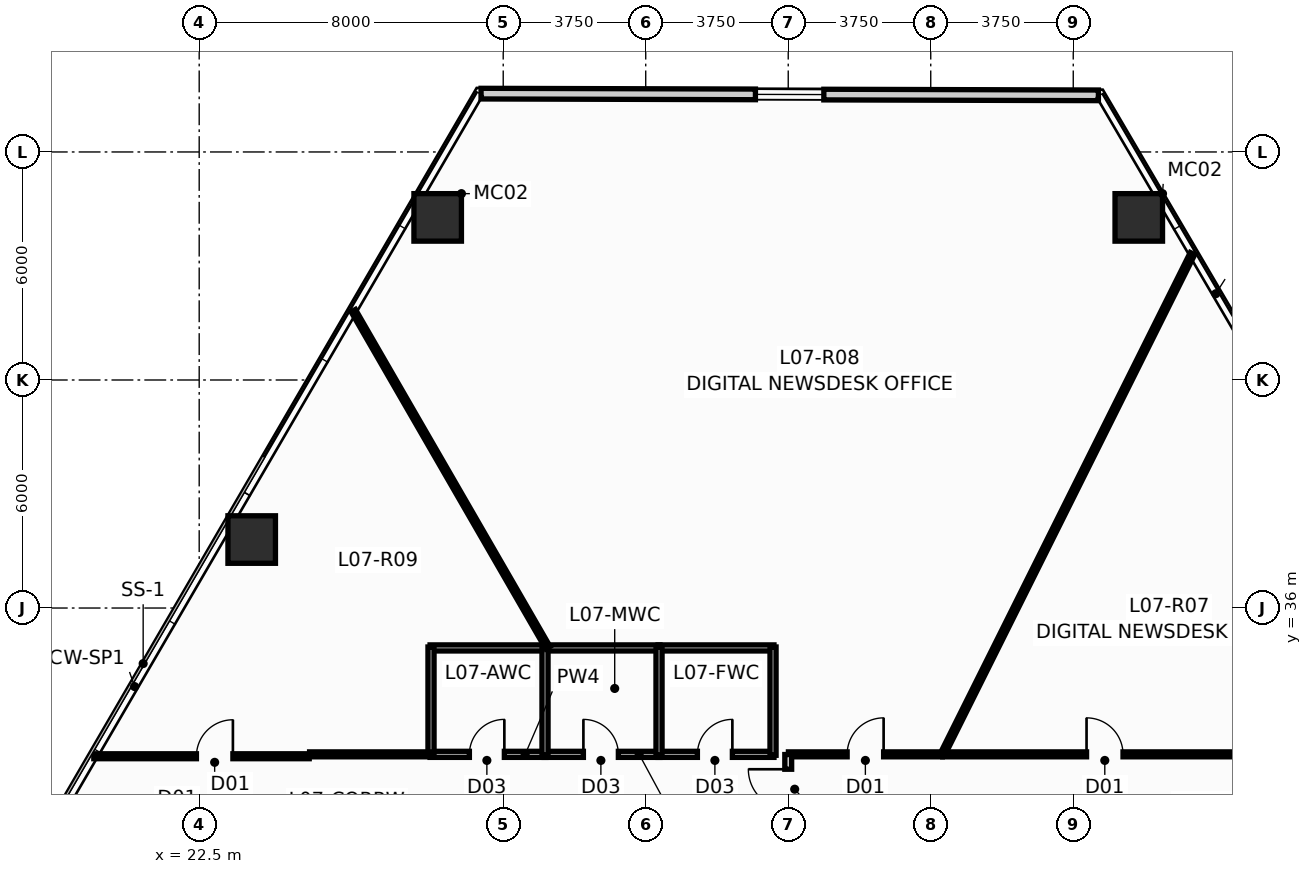
"""IFC4 building model, lengths in metres.
Left out: names, types, materials, properties, quantities, classifications, styles, units other than length and angle.
Written with IfcOpenShell. Run it as: python <this file> out.ifc"""

import sys

from ifc_helpers import new_model, si_unit, direction, frame, frame_2d, origin, origin_2d, place, context, subcontext, project, spatial, rectangle, hollow_rectangle, extrude, source, transform, mapped, element, fill, save


model = new_model("IFC4")
c1 = context("Model", 3, precision=1e-05, world=origin(), true_north=direction((0.0, 1.0)))
c2 = subcontext(c1, "Body", "Model", "MODEL_VIEW")
j1 = project(units=[si_unit("LENGTHUNIT", "METRE"), si_unit("PLANEANGLEUNIT", "RADIAN")], contexts=[c1])
p1 = place(None, origin())
s1 = spatial("IfcSite", under=j1, at=p1, CompositionType="ELEMENT")
p2 = place(p1, origin())
s2 = spatial("IfcBuilding", under=s1, at=p2, CompositionType="ELEMENT")
p3 = place(p2, frame((0.0, 0.0, 31.25)))
s3 = spatial("IfcBuildingStorey", under=s2, at=p3, CompositionType="ELEMENT", Elevation=31.25)
m1 = source(origin(), c2, "Body", "SweptSolid", [
    extrude(hollow_rectangle(XDim=1.25, YDim=1.25, WallThickness=0.07, at=origin_2d()), origin(), (0.0, 0.0, 1.0), 3.651),
])
for number, where, z_axis, x_axis in (
    (1, (47.224, 46.278, 0.0), (-0.024, 0.002, 1.0), (-0.075, -0.997, 0.0)),
    (2, (28.776, 46.278, 0.0), (0.024, 0.002, 1.0), (-0.075, 0.997, 0.0)),
):
    element("IfcColumn", number, at=place(p3, frame(where, z_axis=z_axis, x_axis=x_axis)), inside=s3, PredefinedType="COLUMN", context=c2, shape_type="MappedRepresentation", body=[
        mapped(m1, transform((0.0, 0.0, 0.0), scale=1.0)),
    ])
m2 = source(origin(), c2, "Body", "SweptSolid", [
    extrude(hollow_rectangle(XDim=1.25, YDim=1.25, WallThickness=0.07, at=origin_2d()), origin(), (0.0, 0.0, 1.0), 3.651),
])
p4 = place(p3, frame((23.882, 37.802, 0.0), z_axis=(0.019393993486, -0.006018825565, 0.999793802119), x_axis=(0.296399214872, 0.955064136811, 0.0)))
e3 = element("IfcColumn", 3, at=p4, inside=s3, PredefinedType="COLUMN", context=c2, shape_type="MappedRepresentation", body=[
    mapped(m2, transform((0.0, 0.0, 0.0), scale=1.0)),
])
p5 = place(p3, frame((29.917, 49.535, 0.0), z_axis=(0.0, 0.0, 1.0), x_axis=(0.999996176707, -0.00276524341, 0.0)))
e4 = element("IfcWall", 4, at=p5, inside=s3, PredefinedType="STANDARD", context=c2, shape_type="SweptSolid", body=[
    extrude(rectangle(XDim=16.245, YDim=0.28, at=frame_2d((8.123, 0.0))), origin(), (0.0, 0.0, 1.0), 3.4),
])
p6 = place(p5, frame((7.22, 0.0, 0.9)))
e5 = element("IfcOpeningElement", 5, at=p6, cuts=e4, PredefinedType="OPENING", context=c2, shape_type="SweptSolid", body=[
    extrude(rectangle(XDim=1.8, YDim=1.8, at=frame_2d((0.9, 0.9))), frame((0.0, 0.152, 0.0), z_axis=(0.0, -1.0, 0.0), x_axis=(1.0, 0.0, 0.0)), (0.0, 0.0, 1.0), 0.304),
])
p7 = place(p3, frame((28.575, 32.15, 0.0), z_axis=(0.0, 0.0, 1.0), x_axis=(1.0, 0.0, 0.0)))
e6 = element("IfcWall", 6, at=p7, inside=s3, PredefinedType="PLUMBINGWALL", context=c2, shape_type="SweptSolid", body=[
    extrude(rectangle(XDim=3.05, YDim=0.16, at=frame_2d((1.525, 0.0))), origin(), (0.0, 0.0, 1.0), 3.4),
])
p8 = place(p7, frame((1.035, 0.0, 0.0)))
e7 = element("IfcOpeningElement", 7, at=p8, cuts=e6, PredefinedType="OPENING", context=c2, shape_type="SweptSolid", body=[
    extrude(rectangle(XDim=0.92, YDim=2.1, at=frame_2d((0.46, 1.05))), frame((0.0, 0.092, 0.0), z_axis=(0.0, -1.0, 0.0), x_axis=(1.0, 0.0, 0.0)), (0.0, 0.0, 1.0), 0.184),
])
p9 = place(p3, frame((31.575, 32.15, 0.0), z_axis=(0.0, 0.0, 1.0), x_axis=(1.0, 0.0, 0.0)))
e8 = element("IfcWall", 8, at=p9, inside=s3, PredefinedType="PLUMBINGWALL", context=c2, shape_type="SweptSolid", body=[
    extrude(rectangle(XDim=3.05, YDim=0.16, at=frame_2d((1.525, 0.0))), origin(), (0.0, 0.0, 1.0), 3.4),
])
p10 = place(p9, frame((1.035, 0.0, 0.0)))
e9 = element("IfcOpeningElement", 9, at=p10, cuts=e8, PredefinedType="OPENING", context=c2, shape_type="SweptSolid", body=[
    extrude(rectangle(XDim=0.92, YDim=2.1, at=frame_2d((0.46, 1.05))), frame((0.0, 0.092, 0.0), z_axis=(0.0, -1.0, 0.0), x_axis=(1.0, 0.0, 0.0)), (0.0, 0.0, 1.0), 0.184),
])
p11 = place(p3, frame((34.575, 32.15, 0.0), z_axis=(0.0, 0.0, 1.0), x_axis=(1.0, 0.0, 0.0)))
e10 = element("IfcWall", 10, at=p11, inside=s3, PredefinedType="PLUMBINGWALL", context=c2, shape_type="SweptSolid", body=[
    extrude(rectangle(XDim=3.05, YDim=0.16, at=frame_2d((1.525, 0.0))), origin(), (0.0, 0.0, 1.0), 3.4),
])
p12 = place(p11, frame((1.035, 0.0, 0.0)))
e11 = element("IfcOpeningElement", 11, at=p12, cuts=e10, PredefinedType="OPENING", context=c2, shape_type="SweptSolid", body=[
    extrude(rectangle(XDim=0.92, YDim=2.1, at=frame_2d((0.46, 1.05))), frame((0.0, 0.092, 0.0), z_axis=(0.0, -1.0, 0.0), x_axis=(1.0, 0.0, 0.0)), (0.0, 0.0, 1.0), 0.184),
])
for number, where, z_axis, x_axis in (
    (12, (28.575, 34.95, 0.0), (0.0, 0.0, 1.0), (1.0, 0.0, 0.0)),
    (13, (37.625, 34.95, 0.0), (0.0, 0.0, 1.0), (-1.0, 0.0, 0.0)),
):
    element("IfcWall", number, at=place(p3, frame(where, z_axis=z_axis, x_axis=x_axis)), inside=s3, PredefinedType="PLUMBINGWALL", context=c2, shape_type="SweptSolid", body=[
        extrude(rectangle(XDim=3.05, YDim=0.16, at=frame_2d((1.525, 0.0))), origin(), (0.0, 0.0, 1.0), 3.026),
    ])
p13 = place(p3, frame((31.655, 34.95, 0.0), z_axis=(0.0, 0.0, 1.0), x_axis=(1.0, 0.0, 0.0)))
e14 = element("IfcWall", 14, at=p13, inside=s3, PredefinedType="PLUMBINGWALL", context=c2, shape_type="SweptSolid", body=[
    extrude(rectangle(XDim=2.97, YDim=0.16, at=frame_2d((1.485, 0.0))), origin(), (0.0, 0.0, 1.0), 3.026),
])
for number, where, z_axis, x_axis in (
    (15, (31.6, 32.125, 0.0), (0.0, 0.0, 1.0), (0.0, 1.0, 0.0)),
    (16, (28.6, 32.125, 0.0), (0.0, 0.0, 1.0), (0.0, 1.0, 0.0)),
    (17, (34.6, 32.125, 0.0), (0.0, 0.0, 1.0), (0.0, 1.0, 0.0)),
    (18, (37.6, 32.125, 0.0), (0.0, 0.0, 1.0), (0.0, 1.0, 0.0)),
):
    element("IfcWall", number, at=place(p3, frame(where, z_axis=z_axis, x_axis=x_axis)), inside=s3, PredefinedType="PLUMBINGWALL", context=c2, shape_type="SweptSolid", body=[
        extrude(rectangle(XDim=2.85, YDim=0.16, at=frame_2d((1.425, 0.0))), origin(), (0.0, 0.0, 1.0), 3.4),
    ])
p14 = place(p3, frame((42.062, 32.154, 0.0), z_axis=(0.0, 0.0, 1.0), x_axis=(0.446676229773, 0.894695672146, 0.0)))
e19 = element("IfcWall", 19, at=p14, inside=s3, PredefinedType="PARTITIONING", context=c2, shape_type="SweptSolid", body=[
    extrude(rectangle(XDim=14.722, YDim=0.13, at=frame_2d((7.361, 0.0))), origin(), (0.0, 0.0, 1.0), 2.783),
])
p15 = place(p3, frame((26.555, 43.824, 0.0), z_axis=(0.0, 0.0, 1.0), x_axis=(0.500030569649, -0.86600775367, 0.0)))
e20 = element("IfcWall", 20, at=p15, inside=s3, PredefinedType="PARTITIONING", context=c2, shape_type="SweptSolid", body=[
    extrude(rectangle(XDim=10.242, YDim=0.13, at=frame_2d((5.121, 0.0))), origin(), (0.0, 0.0, 1.0), 3.4),
])
p16 = place(p3, frame((42.065, 32.15, 0.0), z_axis=(0.0, 0.0, 1.0), x_axis=(1.0, 0.0, 0.0)))
e21 = element("IfcWall", 21, at=p16, inside=s3, PredefinedType="PARTITIONING", context=c2, shape_type="SweptSolid", body=[
    extrude(rectangle(XDim=8.53, YDim=0.13, at=frame_2d((4.265, 0.0))), origin(), (0.0, 0.0, 1.0), 3.4),
])
p17 = place(p16, frame((3.785, 0.0, 0.0)))
e22 = element("IfcOpeningElement", 22, at=p17, cuts=e21, PredefinedType="OPENING", context=c2, shape_type="SweptSolid", body=[
    extrude(rectangle(XDim=0.96, YDim=2.15, at=frame_2d((0.48, 1.075))), frame((0.0, 0.077, 0.0), z_axis=(0.0, -1.0, 0.0), x_axis=(1.0, 0.0, 0.0)), (0.0, 0.0, 1.0), 0.154),
])
p18 = place(p3, frame((19.727, 32.1, 0.0), z_axis=(0.0, 0.0, 1.0), x_axis=(1.0, 0.0, 0.0)))
e23 = element("IfcWall", 23, at=p18, inside=s3, PredefinedType="PARTITIONING", context=c2, shape_type="SweptSolid", body=[
    extrude(rectangle(XDim=5.668, YDim=0.13, at=frame_2d((2.834, 0.0))), origin(), (0.0, 0.0, 1.0), 3.4),
])
p19 = place(p18, frame((2.7, 0.0, 0.0)))
e24 = element("IfcOpeningElement", 24, at=p19, cuts=e23, PredefinedType="OPENING", context=c2, shape_type="SweptSolid", body=[
    extrude(rectangle(XDim=0.96, YDim=2.15, at=frame_2d((0.48, 1.075))), frame((0.0, 0.077, 0.0), z_axis=(0.0, -1.0, 0.0), x_axis=(1.0, 0.0, 0.0)), (0.0, 0.0, 1.0), 0.154),
])
p20 = place(p3, frame((38.005, 32.15, 0.0), z_axis=(0.0, 0.0, 1.0), x_axis=(1.0, 0.0, 0.0)))
e25 = element("IfcWall", 25, at=p20, inside=s3, PredefinedType="PARTITIONING", context=c2, shape_type="SweptSolid", body=[
    extrude(rectangle(XDim=4.05, YDim=0.13, at=frame_2d((2.025, 0.0))), origin(), (0.0, 0.0, 1.0), 3.4),
])
p21 = place(p20, frame((1.545, 0.0, 0.0)))
e26 = element("IfcOpeningElement", 26, at=p21, cuts=e25, PredefinedType="OPENING", context=c2, shape_type="SweptSolid", body=[
    extrude(rectangle(XDim=0.96, YDim=2.15, at=frame_2d((0.48, 1.075))), frame((0.0, 0.077, 0.0), z_axis=(0.0, -1.0, 0.0), x_axis=(1.0, 0.0, 0.0)), (0.0, 0.0, 1.0), 0.154),
])
p22 = place(p3, frame((25.405, 32.15, 0.0), z_axis=(0.0, 0.0, 1.0), x_axis=(1.0, 0.0, 0.0)))
e27 = element("IfcWall", 27, at=p22, inside=s3, PredefinedType="PARTITIONING", context=c2, shape_type="SweptSolid", body=[
    extrude(rectangle(XDim=3.19, YDim=0.13, at=frame_2d((1.595, 0.0))), origin(), (0.0, 0.0, 1.0), 3.4),
])
p23 = place(p3, frame((38.0, 30.32, 0.0), z_axis=(0.0, 0.0, 1.0), x_axis=(0.0, 1.0, 0.0)))
e28 = element("IfcWall", 28, at=p23, inside=s3, PredefinedType="PARTITIONING", context=c2, shape_type="SweptSolid", body=[
    extrude(rectangle(XDim=1.825, YDim=0.18, at=frame_2d((0.913, 0.0))), origin(), (0.0, 0.0, 1.0), 3.4),
])
p24 = place(p23, frame((0.388, 0.0, 0.0)))
e29 = element("IfcOpeningElement", 29, at=p24, cuts=e28, PredefinedType="OPENING", context=c2, shape_type="SweptSolid", body=[
    extrude(rectangle(XDim=1.05, YDim=2.15, at=frame_2d((0.525, 1.075))), frame((0.0, 0.102, 0.0), z_axis=(0.0, -1.0, 0.0), x_axis=(1.0, 0.0, 0.0)), (0.0, 0.0, 1.0), 0.204),
])
p25 = place(p6, origin())
e30 = element("IfcWindow", 30, at=p25, inside=s3, PartitioningType="SINGLE_PANEL", PredefinedType="WINDOW", context=c2, shape_type="SweptSolid", body=[
    extrude(rectangle(XDim=1.8, YDim=1.8, at=frame_2d((0.9, 0.9))), frame((0.0, 0.03, 0.0), z_axis=(0.0, -1.0, 0.0), x_axis=(1.0, 0.0, 0.0)), (0.0, 0.0, 1.0), 0.06),
])
fill(e5, e30)
p26 = place(p8, origin())
e31 = element("IfcDoor", 31, at=p26, inside=s3, OperationType="SINGLE_SWING_RIGHT", PredefinedType="DOOR", context=c2, shape_type="SweptSolid", body=[
    extrude(rectangle(XDim=0.92, YDim=2.1, at=frame_2d((0.46, 1.05))), frame((0.0, 0.025, 0.0), z_axis=(0.0, -1.0, 0.0), x_axis=(1.0, 0.0, 0.0)), (0.0, 0.0, 1.0), 0.05),
])
fill(e7, e31)
p27 = place(p10, origin())
e32 = element("IfcDoor", 32, at=p27, inside=s3, OperationType="SINGLE_SWING_LEFT", PredefinedType="DOOR", context=c2, shape_type="SweptSolid", body=[
    extrude(rectangle(XDim=0.92, YDim=2.1, at=frame_2d((0.46, 1.05))), frame((0.0, 0.025, 0.0), z_axis=(0.0, -1.0, 0.0), x_axis=(1.0, 0.0, 0.0)), (0.0, 0.0, 1.0), 0.05),
])
fill(e9, e32)
p28 = place(p12, origin())
e33 = element("IfcDoor", 33, at=p28, inside=s3, OperationType="SINGLE_SWING_RIGHT", PredefinedType="DOOR", context=c2, shape_type="SweptSolid", body=[
    extrude(rectangle(XDim=0.92, YDim=2.1, at=frame_2d((0.46, 1.05))), frame((0.0, 0.025, 0.0), z_axis=(0.0, -1.0, 0.0), x_axis=(1.0, 0.0, 0.0)), (0.0, 0.0, 1.0), 0.05),
])
fill(e11, e33)
p29 = place(p17, origin())
e34 = element("IfcDoor", 34, at=p29, inside=s3, OperationType="SINGLE_SWING_LEFT", PredefinedType="DOOR", context=c2, shape_type="SweptSolid", body=[
    extrude(rectangle(XDim=0.96, YDim=2.15, at=frame_2d((0.48, 1.075))), frame((0.0, 0.025, 0.0), z_axis=(0.0, -1.0, 0.0), x_axis=(1.0, 0.0, 0.0)), (0.0, 0.0, 1.0), 0.05),
])
fill(e22, e34)
p30 = place(p19, origin())
e35 = element("IfcDoor", 35, at=p30, inside=s3, OperationType="SINGLE_SWING_RIGHT", PredefinedType="DOOR", context=c2, shape_type="SweptSolid", body=[
    extrude(rectangle(XDim=0.96, YDim=2.15, at=frame_2d((0.48, 1.075))), frame((0.0, 0.025, 0.0), z_axis=(0.0, -1.0, 0.0), x_axis=(1.0, 0.0, 0.0)), (0.0, 0.0, 1.0), 0.05),
])
fill(e24, e35)
p31 = place(p21, origin())
e36 = element("IfcDoor", 36, at=p31, inside=s3, OperationType="SINGLE_SWING_RIGHT", PredefinedType="DOOR", context=c2, shape_type="SweptSolid", body=[
    extrude(rectangle(XDim=0.96, YDim=2.15, at=frame_2d((0.48, 1.075))), frame((0.0, 0.025, 0.0), z_axis=(0.0, -1.0, 0.0), x_axis=(1.0, 0.0, 0.0)), (0.0, 0.0, 1.0), 0.05),
])
fill(e26, e36)
p32 = place(p24, origin())
e37 = element("IfcDoor", 37, at=p32, inside=s3, OperationType="SINGLE_SWING_RIGHT", PredefinedType="DOOR", context=c2, shape_type="SweptSolid", body=[
    extrude(rectangle(XDim=1.05, YDim=2.15, at=frame_2d((0.525, 1.075))), frame((0.0, 0.025, 0.0), z_axis=(0.0, -1.0, 0.0), x_axis=(1.0, 0.0, 0.0)), (0.0, 0.0, 1.0), 0.05),
])
fill(e29, e37)
save(model, sys.argv[1])
